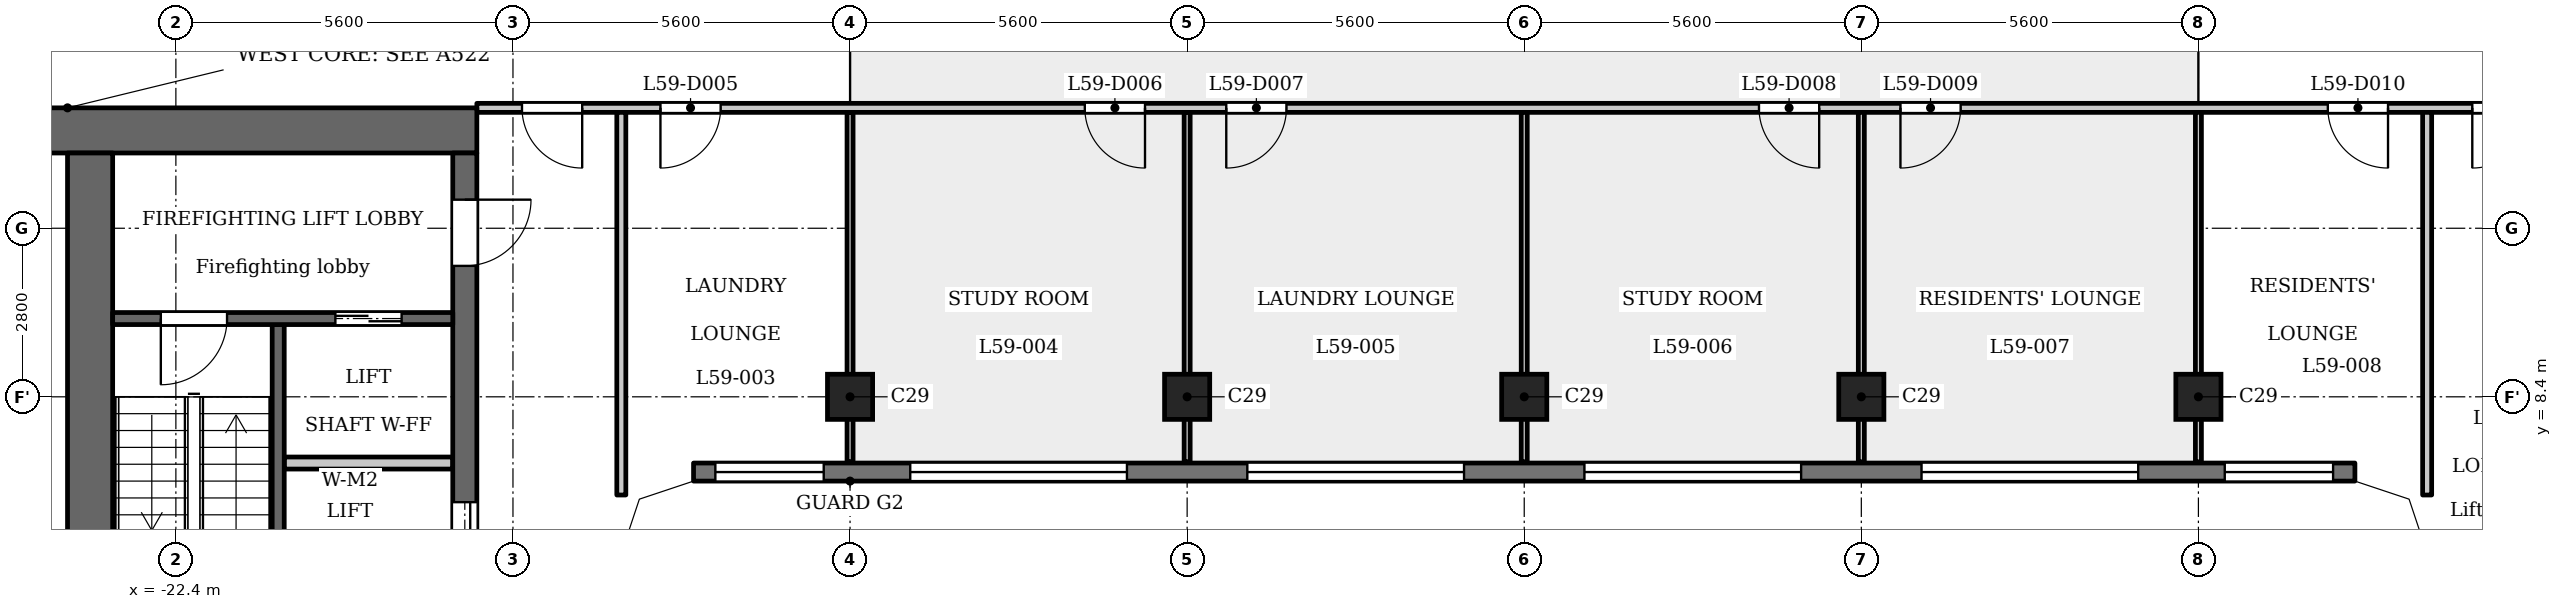
"""IFC4 building model, lengths in metres.
Left out: names, types, materials, properties, quantities, classifications, styles, units other than length and angle.
Written with IfcOpenShell. Run it as: python <this file> out.ifc"""

import sys

from ifc_helpers import new_model, si_unit, direction, frame, frame_2d, origin, origin_2d, place, context, subcontext, project, spatial, polyline, rectangle, outline, extrude, element, fill, save


model = new_model("IFC4")
c1 = context("Model", 3, precision=1e-05, world=origin(), true_north=direction((0.0, 1.0)))
c2 = subcontext(c1, "Body", "Model", "MODEL_VIEW")
j1 = project(units=[si_unit("LENGTHUNIT", "METRE"), si_unit("PLANEANGLEUNIT", "RADIAN")], contexts=[c1])
p1 = place(None, origin())
s1 = spatial("IfcSite", under=j1, at=p1, CompositionType="ELEMENT")
p2 = place(p1, origin())
s2 = spatial("IfcBuilding", under=s1, at=p2, CompositionType="ELEMENT")
p3 = place(p2, frame((0.0, 0.0, 227.4)))
s3 = spatial("IfcBuildingStorey", under=s2, at=p3, CompositionType="ELEMENT", Elevation=227.4)
for number, where, z_axis, x_axis in (
    (1, (-11.2, 8.4, 0.0), (0.0, 0.0, 1.0), (1.0, 0.0, 0.0)),
    (2, (-5.6, 8.4, 0.0), (0.0, 0.0, 1.0), (1.0, 0.0, 0.0)),
    (3, (0.0, 8.4, 0.0), (0.0, 0.0, 1.0), (1.0, 0.0, 0.0)),
    (4, (5.6, 8.4, 0.0), (0.0, 0.0, 1.0), (1.0, 0.0, 0.0)),
    (5, (11.2, 8.4, 0.0), (0.0, 0.0, 1.0), (1.0, 0.0, 0.0)),
):
    element("IfcColumn", number, at=place(p3, frame(where, z_axis=z_axis, x_axis=x_axis)), inside=s3, PredefinedType="COLUMN", context=c2, shape_type="SweptSolid", body=[
        extrude(rectangle(XDim=0.75, YDim=0.75, at=origin_2d()), origin(), (0.0, 0.0, 1.0), 3.5),
    ])
p4 = place(p3, frame((-13.8, 7.15, 0.0), z_axis=(0.0, 0.0, 1.0), x_axis=(1.0, 0.0, 0.0)))
e6 = element("IfcWall", 6, at=p4, inside=s3, PredefinedType="SOLIDWALL", context=c2, shape_type="SweptSolid", body=[
    extrude(rectangle(XDim=27.6, YDim=0.3, at=frame_2d((13.8, 0.0))), origin(), (0.0, 0.0, 1.0), 3.15),
])
p5 = place(p4, frame((0.363, 0.0, 0.9)))
e7 = element("IfcOpeningElement", 7, at=p5, cuts=e6, PredefinedType="OPENING", context=c2, shape_type="SweptSolid", body=[
    extrude(rectangle(XDim=1.8, YDim=1.25, at=frame_2d((0.9, 0.625))), frame((0.0, 0.16, 0.0), z_axis=(0.0, -1.0, 0.0), x_axis=(1.0, 0.0, 0.0)), (0.0, 0.0, 1.0), 0.32),
])
p6 = place(p4, frame((3.6, 0.0, 1.2)))
e8 = element("IfcOpeningElement", 8, at=p6, cuts=e6, PredefinedType="OPENING", context=c2, shape_type="SweptSolid", body=[
    extrude(rectangle(XDim=3.6, YDim=0.95, at=frame_2d((1.8, 0.475))), frame((0.0, 0.16, 0.0), z_axis=(0.0, -1.0, 0.0), x_axis=(1.0, 0.0, 0.0)), (0.0, 0.0, 1.0), 0.32),
])
p7 = place(p4, frame((9.2, 0.0, 1.2)))
e9 = element("IfcOpeningElement", 9, at=p7, cuts=e6, PredefinedType="OPENING", context=c2, shape_type="SweptSolid", body=[
    extrude(rectangle(XDim=3.6, YDim=0.95, at=frame_2d((1.8, 0.475))), frame((0.0, 0.16, 0.0), z_axis=(0.0, -1.0, 0.0), x_axis=(1.0, 0.0, 0.0)), (0.0, 0.0, 1.0), 0.32),
])
p8 = place(p4, frame((14.8, 0.0, 1.2)))
e10 = element("IfcOpeningElement", 10, at=p8, cuts=e6, PredefinedType="OPENING", context=c2, shape_type="SweptSolid", body=[
    extrude(rectangle(XDim=3.6, YDim=0.95, at=frame_2d((1.8, 0.475))), frame((0.0, 0.16, 0.0), z_axis=(0.0, -1.0, 0.0), x_axis=(1.0, 0.0, 0.0)), (0.0, 0.0, 1.0), 0.32),
])
p9 = place(p4, frame((20.4, 0.0, 1.2)))
e11 = element("IfcOpeningElement", 11, at=p9, cuts=e6, PredefinedType="OPENING", context=c2, shape_type="SweptSolid", body=[
    extrude(rectangle(XDim=3.6, YDim=0.95, at=frame_2d((1.8, 0.475))), frame((0.0, 0.16, 0.0), z_axis=(0.0, -1.0, 0.0), x_axis=(1.0, 0.0, 0.0)), (0.0, 0.0, 1.0), 0.32),
])
p10 = place(p4, frame((25.438, 0.0, 0.9)))
e12 = element("IfcOpeningElement", 12, at=p10, cuts=e6, PredefinedType="OPENING", context=c2, shape_type="SweptSolid", body=[
    extrude(rectangle(XDim=1.8, YDim=1.25, at=frame_2d((0.9, 0.625))), frame((0.0, 0.16, 0.0), z_axis=(0.0, -1.0, 0.0), x_axis=(1.0, 0.0, 0.0)), (0.0, 0.0, 1.0), 0.32),
])
p11 = place(p3, frame((-20.7, 2.6, 0.0), z_axis=(0.0, 0.0, 1.0), x_axis=(0.0, 1.0, 0.0)))
e13 = element("IfcWall", 13, at=p11, inside=s3, PredefinedType="SHEAR", context=c2, shape_type="SweptSolid", body=[
    extrude(rectangle(XDim=7.0, YDim=0.2, at=frame_2d((3.5, 0.0))), origin(), (0.0, 0.0, 1.0), 3.15),
])
p12 = place(p3, frame((-17.4, 12.825, 0.0), z_axis=(0.0, 0.0, 1.0), x_axis=(-1.0, 0.0, 0.0)))
e14 = element("IfcWall", 14, at=p12, inside=s3, PredefinedType="SHEAR", context=c2, shape_type="SweptSolid", body=[
    extrude(rectangle(XDim=7.6, YDim=0.75, at=frame_2d((3.8, 0.0))), origin(), (0.0, 0.0, 1.0), 3.15),
])
p13 = place(p3, frame((-17.6, -12.45, 0.0), z_axis=(0.0, 0.0, 1.0), x_axis=(0.0, 1.0, 0.0)))
e15 = element("IfcWall", 15, at=p13, inside=s3, PredefinedType="SHEAR", context=c2, shape_type="SweptSolid", body=[
    extrude(rectangle(XDim=24.9, YDim=0.4, at=frame_2d((12.45, 0.0))), origin(), (0.0, 0.0, 1.0), 3.15),
])
p14 = place(p13, frame((8.65, 0.0, 0.0)))
e16 = element("IfcOpeningElement", 16, at=p14, cuts=e15, PredefinedType="OPENING", context=c2, shape_type="SweptSolid", body=[
    extrude(rectangle(XDim=0.9, YDim=2.1, at=frame_2d((0.45, 1.05))), frame((0.0, 0.21, 0.0), z_axis=(0.0, -1.0, 0.0), x_axis=(1.0, 0.0, 0.0)), (0.0, 0.0, 1.0), 0.42),
])
p15 = place(p13, frame((15.6, 0.0, 0.0)))
e17 = element("IfcOpeningElement", 17, at=p15, cuts=e15, PredefinedType="OPENING", context=c2, shape_type="SweptSolid", body=[
    extrude(rectangle(XDim=1.1, YDim=2.1, at=frame_2d((0.55, 1.05))), frame((0.0, 0.21, 0.0), z_axis=(0.0, -1.0, 0.0), x_axis=(1.0, 0.0, 0.0)), (0.0, 0.0, 1.0), 0.42),
])
p16 = place(p13, frame((18.0, 0.0, 0.0)))
e18 = element("IfcOpeningElement", 18, at=p16, cuts=e15, PredefinedType="OPENING", context=c2, shape_type="SweptSolid", body=[
    extrude(rectangle(XDim=1.1, YDim=2.1, at=frame_2d((0.55, 1.05))), frame((0.0, 0.21, 0.0), z_axis=(0.0, -1.0, 0.0), x_axis=(1.0, 0.0, 0.0)), (0.0, 0.0, 1.0), 0.42),
])
p17 = place(p13, frame((23.025, 0.0, 0.0)))
e19 = element("IfcOpeningElement", 19, at=p17, cuts=e15, PredefinedType="OPENING", context=c2, shape_type="SweptSolid", body=[
    extrude(rectangle(XDim=1.1, YDim=2.1, at=frame_2d((0.55, 1.05))), frame((0.0, 0.21, 0.0), z_axis=(0.0, -1.0, 0.0), x_axis=(1.0, 0.0, 0.0)), (0.0, 0.0, 1.0), 0.42),
])
p18 = place(p13, frame((0.775, 0.0, 0.0)))
e20 = element("IfcOpeningElement", 20, at=p18, cuts=e15, PredefinedType="OPENING", context=c2, shape_type="SweptSolid", body=[
    extrude(rectangle(XDim=1.1, YDim=2.1, at=frame_2d((0.55, 1.05))), frame((0.0, 0.21, 0.0), z_axis=(0.0, -1.0, 0.0), x_axis=(1.0, 0.0, 0.0)), (0.0, 0.0, 1.0), 0.42),
])
p19 = place(p13, frame((12.925, 0.0, 0.0)))
e21 = element("IfcOpeningElement", 21, at=p19, cuts=e15, PredefinedType="OPENING", context=c2, shape_type="SweptSolid", body=[
    extrude(rectangle(XDim=1.8, YDim=2.1, at=frame_2d((0.9, 1.05))), frame((0.0, 0.21, 0.0), z_axis=(0.0, -1.0, 0.0), x_axis=(1.0, 0.0, 0.0)), (0.0, 0.0, 1.0), 0.42),
])
p20 = place(p3, frame((-23.825, -12.45, 0.0), z_axis=(0.0, 0.0, 1.0), x_axis=(0.0, 1.0, 0.0)))
e22 = element("IfcWall", 22, at=p20, inside=s3, PredefinedType="SHEAR", context=c2, shape_type="SweptSolid", body=[
    extrude(rectangle(XDim=24.9, YDim=0.75, at=frame_2d((12.45, 0.0))), origin(), (0.0, 0.0, 1.0), 3.15),
])
p21 = place(p3, frame((-17.8, 7.3, 0.0), z_axis=(0.0, 0.0, 1.0), x_axis=(-1.0, 0.0, 0.0)))
e23 = element("IfcWall", 23, at=p21, inside=s3, PredefinedType="PARTITIONING", context=c2, shape_type="SweptSolid", body=[
    extrude(rectangle(XDim=2.8, YDim=0.2, at=frame_2d((1.4, 0.0))), origin(), (0.0, 0.0, 1.0), 3.15),
])
p22 = place(p3, frame((-17.8, 9.7, 0.0), z_axis=(0.0, 0.0, 1.0), x_axis=(-1.0, 0.0, 0.0)))
e24 = element("IfcWall", 24, at=p22, inside=s3, PredefinedType="SHEAR", context=c2, shape_type="SweptSolid", body=[
    extrude(rectangle(XDim=5.65, YDim=0.2, at=frame_2d((2.825, 0.0))), origin(), (0.0, 0.0, 1.0), 3.15),
])
p23 = place(p22, frame((0.85, 0.0, 0.0)))
e25 = element("IfcOpeningElement", 25, at=p23, cuts=e24, PredefinedType="OPENING", context=c2, shape_type="SweptSolid", body=[
    extrude(rectangle(XDim=1.1, YDim=2.1, at=frame_2d((0.55, 1.05))), frame((0.0, 0.11, 0.0), z_axis=(0.0, -1.0, 0.0), x_axis=(1.0, 0.0, 0.0)), (0.0, 0.0, 1.0), 0.22),
])
p24 = place(p22, frame((3.75, 0.0, 0.0)))
e26 = element("IfcOpeningElement", 26, at=p24, cuts=e24, PredefinedType="OPENING", context=c2, shape_type="SweptSolid", body=[
    extrude(rectangle(XDim=1.1, YDim=2.1, at=frame_2d((0.55, 1.05))), frame((0.0, 0.11, 0.0), z_axis=(0.0, -1.0, 0.0), x_axis=(1.0, 0.0, 0.0)), (0.0, 0.0, 1.0), 0.22),
])
p25 = place(p3, frame((-17.4, 13.2, 0.0), z_axis=(0.0, 0.0, 1.0), x_axis=(1.0, 0.0, 0.0)))
e27 = element("IfcWall", 27, at=p25, inside=s3, PredefinedType="PARTITIONING", context=c2, shape_type="SweptSolid", body=[
    extrude(rectangle(XDim=34.8, YDim=0.15, at=frame_2d((17.4, 0.0))), origin(), (0.0, 0.0, 1.0), 3.15),
])
p26 = place(p25, frame((0.75, 0.0, 0.0)))
e28 = element("IfcOpeningElement", 28, at=p26, cuts=e27, PredefinedType="OPENING", context=c2, shape_type="SweptSolid", body=[
    extrude(rectangle(XDim=1.0, YDim=2.1, at=frame_2d((0.5, 1.05))), frame((0.0, 0.085, 0.0), z_axis=(0.0, -1.0, 0.0), x_axis=(1.0, 0.0, 0.0)), (0.0, 0.0, 1.0), 0.17),
])
p27 = place(p25, frame((33.15, 0.0, 0.0)))
e29 = element("IfcOpeningElement", 29, at=p27, cuts=e27, PredefinedType="OPENING", context=c2, shape_type="SweptSolid", body=[
    extrude(rectangle(XDim=1.0, YDim=2.1, at=frame_2d((0.5, 1.05))), frame((0.0, 0.085, 0.0), z_axis=(0.0, -1.0, 0.0), x_axis=(1.0, 0.0, 0.0)), (0.0, 0.0, 1.0), 0.17),
])
p28 = place(p25, frame((3.05, 0.0, 0.0)))
e30 = element("IfcOpeningElement", 30, at=p28, cuts=e27, PredefinedType="OPENING", context=c2, shape_type="SweptSolid", body=[
    extrude(rectangle(XDim=1.0, YDim=2.1, at=frame_2d((0.5, 1.05))), frame((0.0, 0.085, 0.0), z_axis=(0.0, -1.0, 0.0), x_axis=(1.0, 0.0, 0.0)), (0.0, 0.0, 1.0), 0.17),
])
p29 = place(p25, frame((10.1, 0.0, 0.0)))
e31 = element("IfcOpeningElement", 31, at=p29, cuts=e27, PredefinedType="OPENING", context=c2, shape_type="SweptSolid", body=[
    extrude(rectangle(XDim=1.0, YDim=2.1, at=frame_2d((0.5, 1.05))), frame((0.0, 0.085, 0.0), z_axis=(0.0, -1.0, 0.0), x_axis=(1.0, 0.0, 0.0)), (0.0, 0.0, 1.0), 0.17),
])
p30 = place(p25, frame((12.45, 0.0, 0.0)))
e32 = element("IfcOpeningElement", 32, at=p30, cuts=e27, PredefinedType="OPENING", context=c2, shape_type="SweptSolid", body=[
    extrude(rectangle(XDim=1.0, YDim=2.1, at=frame_2d((0.5, 1.05))), frame((0.0, 0.085, 0.0), z_axis=(0.0, -1.0, 0.0), x_axis=(1.0, 0.0, 0.0)), (0.0, 0.0, 1.0), 0.17),
])
p31 = place(p25, frame((21.3, 0.0, 0.0)))
e33 = element("IfcOpeningElement", 33, at=p31, cuts=e27, PredefinedType="OPENING", context=c2, shape_type="SweptSolid", body=[
    extrude(rectangle(XDim=1.0, YDim=2.1, at=frame_2d((0.5, 1.05))), frame((0.0, 0.085, 0.0), z_axis=(0.0, -1.0, 0.0), x_axis=(1.0, 0.0, 0.0)), (0.0, 0.0, 1.0), 0.17),
])
p32 = place(p25, frame((23.65, 0.0, 0.0)))
e34 = element("IfcOpeningElement", 34, at=p32, cuts=e27, PredefinedType="OPENING", context=c2, shape_type="SweptSolid", body=[
    extrude(rectangle(XDim=1.0, YDim=2.1, at=frame_2d((0.5, 1.05))), frame((0.0, 0.085, 0.0), z_axis=(0.0, -1.0, 0.0), x_axis=(1.0, 0.0, 0.0)), (0.0, 0.0, 1.0), 0.17),
])
p33 = place(p25, frame((30.75, 0.0, 0.0)))
e35 = element("IfcOpeningElement", 35, at=p33, cuts=e27, PredefinedType="OPENING", context=c2, shape_type="SweptSolid", body=[
    extrude(rectangle(XDim=1.0, YDim=2.1, at=frame_2d((0.5, 1.05))), frame((0.0, 0.085, 0.0), z_axis=(0.0, -1.0, 0.0), x_axis=(1.0, 0.0, 0.0)), (0.0, 0.0, 1.0), 0.17),
])
p34 = place(p3, frame((-15.0, 6.769, 0.0), z_axis=(0.0, 0.0, 1.0), x_axis=(0.0, 1.0, 0.0)))
e36 = element("IfcWall", 36, at=p34, inside=s3, PredefinedType="PARTITIONING", context=c2, shape_type="SweptSolid", body=[
    extrude(rectangle(XDim=6.356, YDim=0.15, at=frame_2d((3.178, 0.0))), origin(), (0.0, 0.0, 1.0), 3.15),
])
for number, where, z_axis, x_axis in (
    (37, (-11.2, 7.32, 0.0), (0.0, 0.0, 1.0), (0.0, 1.0, 0.0)),
    (38, (-5.6, 7.32, 0.0), (0.0, 0.0, 1.0), (0.0, 1.0, 0.0)),
    (39, (0.0, 7.32, 0.0), (0.0, 0.0, 1.0), (0.0, 1.0, 0.0)),
    (40, (5.6, 7.32, 0.0), (0.0, 0.0, 1.0), (0.0, 1.0, 0.0)),
    (41, (11.2, 7.32, 0.0), (0.0, 0.0, 1.0), (0.0, 1.0, 0.0)),
):
    element("IfcWall", number, at=place(p3, frame(where, z_axis=z_axis, x_axis=x_axis)), inside=s3, PredefinedType="PARTITIONING", context=c2, shape_type="SweptSolid", body=[
        extrude(rectangle(XDim=5.805, YDim=0.1, at=frame_2d((2.902, 0.0))), origin(), (0.0, 0.0, 1.0), 3.15),
    ])
p35 = place(p3, frame((15.0, 6.769, 0.0), z_axis=(0.0, 0.0, 1.0), x_axis=(0.0, 1.0, 0.0)))
e42 = element("IfcWall", 42, at=p35, inside=s3, PredefinedType="PARTITIONING", context=c2, shape_type="SweptSolid", body=[
    extrude(rectangle(XDim=6.356, YDim=0.15, at=frame_2d((3.178, 0.0))), origin(), (0.0, 0.0, 1.0), 3.15),
])
p36 = place(p3, origin())
e43 = element("IfcWall", 43, at=p36, inside=s3, PredefinedType="SOLIDWALL", context=c2, shape_type="SweptSolid", body=[
    extrude(outline(polyline([(-13.849, 7.3), (-14.937, 6.937), (-15.3, 5.849), (-15.3, 5.8), (-15.0, 5.8), (-14.7, 6.7), (-13.8, 7.0), (-13.8, 7.3), (-13.849, 7.3)])), origin(), (0.0, 0.0, 1.0), 3.15),
])
e44 = element("IfcWall", 44, at=p36, inside=s3, PredefinedType="SOLIDWALL", context=c2, shape_type="SweptSolid", body=[
    extrude(outline(polyline([(14.937, 6.937), (13.849, 7.3), (13.8, 7.3), (13.8, 7.0), (14.7, 6.7), (15.0, 5.8), (15.3, 5.8), (15.3, 5.849), (14.937, 6.937)])), origin(), (0.0, 0.0, 1.0), 3.15),
])
p37 = place(p16, origin())
e45 = element("IfcDoor", 45, at=p37, inside=s3, OperationType="DOUBLE_DOOR_SLIDING", PredefinedType="DOOR", context=c2, shape_type="SweptSolid", body=[
    extrude(rectangle(XDim=1.1, YDim=2.1, at=frame_2d((0.55, 1.05))), frame((0.0, 0.025, 0.0), z_axis=(0.0, -1.0, 0.0), x_axis=(1.0, 0.0, 0.0)), (0.0, 0.0, 1.0), 0.05),
])
fill(e18, e45)
p38 = place(p23, origin())
e46 = element("IfcDoor", 46, at=p38, inside=s3, OperationType="DOUBLE_DOOR_SLIDING", PredefinedType="DOOR", context=c2, shape_type="SweptSolid", body=[
    extrude(rectangle(XDim=1.1, YDim=2.1, at=frame_2d((0.55, 1.05))), frame((0.0, 0.025, 0.0), z_axis=(0.0, -1.0, 0.0), x_axis=(1.0, 0.0, 0.0)), (0.0, 0.0, 1.0), 0.05),
])
fill(e25, e46)
p39 = place(p17, origin())
e47 = element("IfcDoor", 47, at=p39, inside=s3, OperationType="SINGLE_SWING_RIGHT", PredefinedType="DOOR", context=c2, shape_type="SweptSolid", body=[
    extrude(rectangle(XDim=1.1, YDim=2.1, at=frame_2d((0.55, 1.05))), frame((0.0, 0.025, 0.0), z_axis=(0.0, -1.0, 0.0), x_axis=(1.0, 0.0, 0.0)), (0.0, 0.0, 1.0), 0.05),
])
fill(e19, e47)
p40 = place(p24, origin())
e48 = element("IfcDoor", 48, at=p40, inside=s3, OperationType="SINGLE_SWING_LEFT", PredefinedType="DOOR", context=c2, shape_type="SweptSolid", body=[
    extrude(rectangle(XDim=1.1, YDim=2.1, at=frame_2d((0.55, 1.05))), frame((0.0, 0.025, 0.0), z_axis=(0.0, -1.0, 0.0), x_axis=(1.0, 0.0, 0.0)), (0.0, 0.0, 1.0), 0.05),
])
fill(e26, e48)
p41 = place(p26, origin())
e49 = element("IfcDoor", 49, at=p41, inside=s3, OperationType="SINGLE_SWING_RIGHT", PredefinedType="DOOR", context=c2, shape_type="SweptSolid", body=[
    extrude(rectangle(XDim=1.0, YDim=2.1, at=frame_2d((0.5, 1.05))), frame((0.0, 0.025, 0.0), z_axis=(0.0, -1.0, 0.0), x_axis=(1.0, 0.0, 0.0)), (0.0, 0.0, 1.0), 0.05),
])
fill(e28, e49)
p42 = place(p27, origin())
e50 = element("IfcDoor", 50, at=p42, inside=s3, OperationType="SINGLE_SWING_LEFT", PredefinedType="DOOR", context=c2, shape_type="SweptSolid", body=[
    extrude(rectangle(XDim=1.0, YDim=2.1, at=frame_2d((0.5, 1.05))), frame((0.0, 0.025, 0.0), z_axis=(0.0, -1.0, 0.0), x_axis=(1.0, 0.0, 0.0)), (0.0, 0.0, 1.0), 0.05),
])
fill(e29, e50)
p43 = place(p28, origin())
e51 = element("IfcDoor", 51, at=p43, inside=s3, OperationType="SINGLE_SWING_LEFT", PredefinedType="DOOR", context=c2, shape_type="SweptSolid", body=[
    extrude(rectangle(XDim=1.0, YDim=2.1, at=frame_2d((0.5, 1.05))), frame((0.0, 0.025, 0.0), z_axis=(0.0, -1.0, 0.0), x_axis=(1.0, 0.0, 0.0)), (0.0, 0.0, 1.0), 0.05),
])
fill(e30, e51)
p44 = place(p29, origin())
e52 = element("IfcDoor", 52, at=p44, inside=s3, OperationType="SINGLE_SWING_RIGHT", PredefinedType="DOOR", context=c2, shape_type="SweptSolid", body=[
    extrude(rectangle(XDim=1.0, YDim=2.1, at=frame_2d((0.5, 1.05))), frame((0.0, 0.025, 0.0), z_axis=(0.0, -1.0, 0.0), x_axis=(1.0, 0.0, 0.0)), (0.0, 0.0, 1.0), 0.05),
])
fill(e31, e52)
p45 = place(p30, origin())
e53 = element("IfcDoor", 53, at=p45, inside=s3, OperationType="SINGLE_SWING_LEFT", PredefinedType="DOOR", context=c2, shape_type="SweptSolid", body=[
    extrude(rectangle(XDim=1.0, YDim=2.1, at=frame_2d((0.5, 1.05))), frame((0.0, 0.025, 0.0), z_axis=(0.0, -1.0, 0.0), x_axis=(1.0, 0.0, 0.0)), (0.0, 0.0, 1.0), 0.05),
])
fill(e32, e53)
p46 = place(p31, origin())
e54 = element("IfcDoor", 54, at=p46, inside=s3, OperationType="SINGLE_SWING_RIGHT", PredefinedType="DOOR", context=c2, shape_type="SweptSolid", body=[
    extrude(rectangle(XDim=1.0, YDim=2.1, at=frame_2d((0.5, 1.05))), frame((0.0, 0.025, 0.0), z_axis=(0.0, -1.0, 0.0), x_axis=(1.0, 0.0, 0.0)), (0.0, 0.0, 1.0), 0.05),
])
fill(e33, e54)
p47 = place(p32, origin())
e55 = element("IfcDoor", 55, at=p47, inside=s3, OperationType="SINGLE_SWING_LEFT", PredefinedType="DOOR", context=c2, shape_type="SweptSolid", body=[
    extrude(rectangle(XDim=1.0, YDim=2.1, at=frame_2d((0.5, 1.05))), frame((0.0, 0.025, 0.0), z_axis=(0.0, -1.0, 0.0), x_axis=(1.0, 0.0, 0.0)), (0.0, 0.0, 1.0), 0.05),
])
fill(e34, e55)
p48 = place(p33, origin())
e56 = element("IfcDoor", 56, at=p48, inside=s3, OperationType="SINGLE_SWING_RIGHT", PredefinedType="DOOR", context=c2, shape_type="SweptSolid", body=[
    extrude(rectangle(XDim=1.0, YDim=2.1, at=frame_2d((0.5, 1.05))), frame((0.0, 0.025, 0.0), z_axis=(0.0, -1.0, 0.0), x_axis=(1.0, 0.0, 0.0)), (0.0, 0.0, 1.0), 0.05),
])
fill(e35, e56)
p49 = place(p5, origin())
e57 = element("IfcWindow", 57, at=p49, inside=s3, PartitioningType="SINGLE_PANEL", PredefinedType="WINDOW", context=c2, shape_type="SweptSolid", body=[
    extrude(rectangle(XDim=1.8, YDim=1.25, at=frame_2d((0.9, 0.625))), frame((0.0, 0.03, 0.0), z_axis=(0.0, -1.0, 0.0), x_axis=(1.0, 0.0, 0.0)), (0.0, 0.0, 1.0), 0.06),
])
fill(e7, e57)
p50 = place(p6, origin())
e58 = element("IfcWindow", 58, at=p50, inside=s3, PartitioningType="SINGLE_PANEL", PredefinedType="WINDOW", context=c2, shape_type="SweptSolid", body=[
    extrude(rectangle(XDim=3.6, YDim=0.95, at=frame_2d((1.8, 0.475))), frame((0.0, 0.03, 0.0), z_axis=(0.0, -1.0, 0.0), x_axis=(1.0, 0.0, 0.0)), (0.0, 0.0, 1.0), 0.06),
])
fill(e8, e58)
p51 = place(p7, origin())
e59 = element("IfcWindow", 59, at=p51, inside=s3, PartitioningType="SINGLE_PANEL", PredefinedType="WINDOW", context=c2, shape_type="SweptSolid", body=[
    extrude(rectangle(XDim=3.6, YDim=0.95, at=frame_2d((1.8, 0.475))), frame((0.0, 0.03, 0.0), z_axis=(0.0, -1.0, 0.0), x_axis=(1.0, 0.0, 0.0)), (0.0, 0.0, 1.0), 0.06),
])
fill(e9, e59)
p52 = place(p8, origin())
e60 = element("IfcWindow", 60, at=p52, inside=s3, PartitioningType="SINGLE_PANEL", PredefinedType="WINDOW", context=c2, shape_type="SweptSolid", body=[
    extrude(rectangle(XDim=3.6, YDim=0.95, at=frame_2d((1.8, 0.475))), frame((0.0, 0.03, 0.0), z_axis=(0.0, -1.0, 0.0), x_axis=(1.0, 0.0, 0.0)), (0.0, 0.0, 1.0), 0.06),
])
fill(e10, e60)
p53 = place(p9, origin())
e61 = element("IfcWindow", 61, at=p53, inside=s3, PartitioningType="SINGLE_PANEL", PredefinedType="WINDOW", context=c2, shape_type="SweptSolid", body=[
    extrude(rectangle(XDim=3.6, YDim=0.95, at=frame_2d((1.8, 0.475))), frame((0.0, 0.03, 0.0), z_axis=(0.0, -1.0, 0.0), x_axis=(1.0, 0.0, 0.0)), (0.0, 0.0, 1.0), 0.06),
])
fill(e11, e61)
p54 = place(p10, origin())
e62 = element("IfcWindow", 62, at=p54, inside=s3, PartitioningType="SINGLE_PANEL", PredefinedType="WINDOW", context=c2, shape_type="SweptSolid", body=[
    extrude(rectangle(XDim=1.8, YDim=1.25, at=frame_2d((0.9, 0.625))), frame((0.0, 0.03, 0.0), z_axis=(0.0, -1.0, 0.0), x_axis=(1.0, 0.0, 0.0)), (0.0, 0.0, 1.0), 0.06),
])
fill(e12, e62)
save(model, sys.argv[1])
